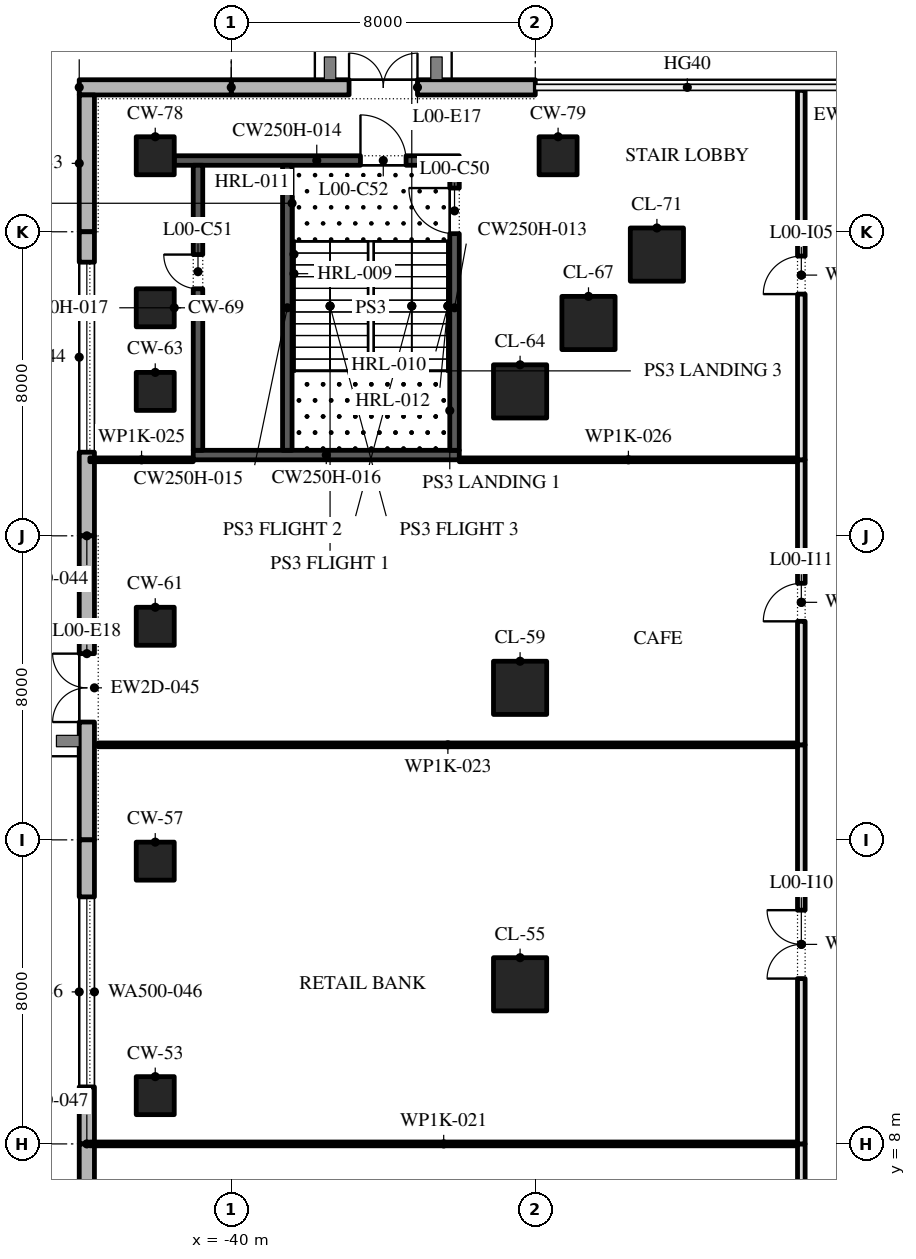
"""IFC4 building model, lengths in metres.
Left out: names, types, materials, properties, quantities, classifications, styles, units other than length and angle.
Written with IfcOpenShell. Run it as: python <this file> out.ifc"""

import sys

from ifc_helpers import new_model, si_unit, direction, frame, frame_2d, origin, origin_2d, place, context, subcontext, project, spatial, polyline, rectangle, outline, extrude, element, fill, save


model = new_model("IFC4")
c1 = context("Model", 3, precision=1e-05, world=origin(), true_north=direction((0.0, 1.0)))
c2 = subcontext(c1, "Body", "Model", "MODEL_VIEW")
j1 = project(units=[si_unit("LENGTHUNIT", "METRE"), si_unit("PLANEANGLEUNIT", "RADIAN")], contexts=[c1])
p1 = place(None, origin())
s1 = spatial("IfcSite", under=j1, at=p1, CompositionType="ELEMENT")
p2 = place(p1, origin())
s2 = spatial("IfcBuilding", under=s1, at=p2, CompositionType="ELEMENT")
p3 = place(p2, origin())
s3 = spatial("IfcBuildingStorey", under=s2, at=p3, CompositionType="ELEMENT", Elevation=0.0)
p4 = place(p3, frame((-42.0, 9.27, 0.0), z_axis=(0.0, 0.0, 1.0), x_axis=(1.0, 0.0, 0.0)))
e1 = element("IfcColumn", 1, at=p4, inside=s3, PredefinedType="COLUMN", context=c2, shape_type="SweptSolid", body=[
    extrude(rectangle(XDim=1.0, YDim=1.0, at=origin_2d()), origin(), (0.0, 0.0, 1.0), 8.0),
])
p5 = place(p3, frame((-32.4, 12.2, 0.0), z_axis=(0.0, 0.0, 1.0), x_axis=(1.0, 0.0, 0.0)))
e2 = element("IfcColumn", 2, at=p5, inside=s3, PredefinedType="COLUMN", context=c2, shape_type="SweptSolid", body=[
    extrude(rectangle(XDim=1.4, YDim=1.4, at=origin_2d()), origin(), (0.0, 0.0, 1.0), 8.0),
])
p6 = place(p3, frame((-42.0, 15.44, 0.0), z_axis=(0.0, 0.0, 1.0), x_axis=(1.0, 0.0, 0.0)))
e3 = element("IfcColumn", 3, at=p6, inside=s3, PredefinedType="COLUMN", context=c2, shape_type="SweptSolid", body=[
    extrude(rectangle(XDim=1.0, YDim=1.0, at=origin_2d()), origin(), (0.0, 0.0, 1.0), 8.0),
])
p7 = place(p3, frame((-32.4, 20.0, 0.0), z_axis=(0.0, 0.0, 1.0), x_axis=(1.0, 0.0, 0.0)))
e4 = element("IfcColumn", 4, at=p7, inside=s3, PredefinedType="COLUMN", context=c2, shape_type="SweptSolid", body=[
    extrude(rectangle(XDim=1.4, YDim=1.4, at=origin_2d()), origin(), (0.0, 0.0, 1.0), 8.0),
])
for number, where, z_axis, x_axis in (
    (5, (-42.0, 21.62, 0.0), (0.0, 0.0, 1.0), (1.0, 0.0, 0.0)),
    (6, (-42.0, 27.8, 0.0), (0.0, 0.0, 1.0), (1.0, 0.0, 0.0)),
):
    element("IfcColumn", number, at=place(p3, frame(where, z_axis=z_axis, x_axis=x_axis)), inside=s3, PredefinedType="COLUMN", context=c2, shape_type="SweptSolid", body=[
        extrude(rectangle(XDim=1.0, YDim=1.0, at=origin_2d()), origin(), (0.0, 0.0, 1.0), 8.0),
    ])
for number, where, z_axis, x_axis in (
    (7, (-32.4, 27.8, 0.0), (0.0, 0.0, 1.0), (1.0, 0.0, 0.0)),
    (8, (-30.6, 29.6, 0.0), (0.0, 0.0, 1.0), (1.0, 0.0, 0.0)),
):
    element("IfcColumn", number, at=place(p3, frame(where, z_axis=z_axis, x_axis=x_axis)), inside=s3, PredefinedType="COLUMN", context=c2, shape_type="SweptSolid", body=[
        extrude(rectangle(XDim=1.4, YDim=1.4, at=origin_2d()), origin(), (0.0, 0.0, 1.0), 8.0),
    ])
p8 = place(p3, frame((-42.0, 30.0, 0.0), z_axis=(0.0, 0.0, 1.0), x_axis=(1.0, 0.0, 0.0)))
e9 = element("IfcColumn", 9, at=p8, inside=s3, PredefinedType="COLUMN", context=c2, shape_type="SweptSolid", body=[
    extrude(rectangle(XDim=1.0, YDim=1.0, at=origin_2d()), origin(), (0.0, 0.0, 1.0), 8.0),
])
p9 = place(p3, frame((-28.8, 31.4, 0.0), z_axis=(0.0, 0.0, 1.0), x_axis=(1.0, 0.0, 0.0)))
e10 = element("IfcColumn", 10, at=p9, inside=s3, PredefinedType="COLUMN", context=c2, shape_type="SweptSolid", body=[
    extrude(rectangle(XDim=1.4, YDim=1.4, at=origin_2d()), origin(), (0.0, 0.0, 1.0), 8.0),
])
for number, where, z_axis, x_axis in (
    (11, (-42.0, 34.0, 0.0), (0.0, 0.0, 1.0), (1.0, 0.0, 0.0)),
    (12, (-31.4, 34.0, 0.0), (0.0, 0.0, 1.0), (1.0, 0.0, 0.0)),
):
    element("IfcColumn", number, at=place(p3, frame(where, z_axis=z_axis, x_axis=x_axis)), inside=s3, PredefinedType="COLUMN", context=c2, shape_type="SweptSolid", body=[
        extrude(rectangle(XDim=1.0, YDim=1.0, at=origin_2d()), origin(), (0.0, 0.0, 1.0), 8.0),
    ])
p10 = place(p3, frame((-32.0, 35.8, 0.0), z_axis=(0.0, 0.0, 1.0), x_axis=(-1.0, 0.0, 0.0)))
e13 = element("IfcWall", 13, at=p10, inside=s3, PredefinedType="STANDARD", context=c2, shape_type="SweptSolid", body=[
    extrude(rectangle(XDim=8.0, YDim=0.4, at=frame_2d((4.0, 0.0))), origin(), (0.0, 0.0, 1.0), 7.7),
])
p11 = place(p10, frame((3.1, 0.0, 0.0)))
e14 = element("IfcOpeningElement", 14, at=p11, cuts=e13, PredefinedType="OPENING", context=c2, shape_type="SweptSolid", body=[
    extrude(rectangle(XDim=1.8, YDim=2.7, at=frame_2d((0.9, 1.35))), frame((0.0, 0.21, 0.0), z_axis=(0.0, -1.0, 0.0), x_axis=(1.0, 0.0, 0.0)), (0.0, 0.0, 1.0), 0.42),
])
p12 = place(p3, frame((-40.0, 35.8, 0.0), z_axis=(0.0, 0.0, 1.0), x_axis=(-1.0, 0.0, 0.0)))
e15 = element("IfcWall", 15, at=p12, inside=s3, PredefinedType="STANDARD", context=c2, shape_type="SweptSolid", body=[
    extrude(rectangle(XDim=4.0, YDim=0.4, at=frame_2d((2.0, 0.0))), origin(), (0.0, 0.0, 1.0), 7.7),
])
p13 = place(p3, frame((-43.8, 35.6, 0.0), z_axis=(0.0, 0.0, 1.0), x_axis=(0.0, -1.0, 0.0)))
e16 = element("IfcWall", 16, at=p13, inside=s3, PredefinedType="STANDARD", context=c2, shape_type="SweptSolid", body=[
    extrude(rectangle(XDim=3.6, YDim=0.4, at=frame_2d((1.8, 0.0))), origin(), (0.0, 0.0, 1.0), 7.7),
])
p14 = place(p3, frame((-43.8, 32.0, 0.0), z_axis=(0.0, 0.0, 1.0), x_axis=(0.0, -1.0, 0.0)))
e17 = element("IfcWall", 17, at=p14, inside=s3, PredefinedType="STANDARD", context=c2, shape_type="SweptSolid", body=[
    extrude(rectangle(XDim=8.0, YDim=0.4, at=frame_2d((4.0, 0.0))), origin(), (0.0, 0.0, 1.0), 7.7),
])
p15 = place(p14, frame((0.8, 0.0, 0.5)))
e18 = element("IfcOpeningElement", 18, at=p15, cuts=e17, PredefinedType="OPENING", context=c2, shape_type="SweptSolid", body=[
    extrude(outline(polyline([(0.0, 0.0), (5.0, 0.0), (5.0, 3.35), (4.955, 3.907), (4.822, 4.451), (4.604, 4.966), (4.306, 5.44), (3.937, 5.86), (3.505, 6.216), (3.022, 6.498), (2.5, 6.7), (1.978, 6.498), (1.495, 6.216), (1.063, 5.86), (0.694, 5.44), (0.396, 4.966), (0.178, 4.451), (0.045, 3.907), (0.0, 3.35), (0.0, 0.0)])), frame((0.0, 0.21, 0.0), z_axis=(0.0, -1.0, 0.0), x_axis=(1.0, 0.0, 0.0)), (0.0, 0.0, 1.0), 0.42),
])
p16 = place(p3, frame((-43.8, 24.0, 0.0), z_axis=(0.0, 0.0, 1.0), x_axis=(0.0, -1.0, 0.0)))
e19 = element("IfcWall", 19, at=p16, inside=s3, PredefinedType="STANDARD", context=c2, shape_type="SweptSolid", body=[
    extrude(rectangle(XDim=8.0, YDim=0.4, at=frame_2d((4.0, 0.0))), origin(), (0.0, 0.0, 1.0), 7.7),
])
p17 = place(p16, frame((3.1, 0.0, 0.0)))
e20 = element("IfcOpeningElement", 20, at=p17, cuts=e19, PredefinedType="OPENING", context=c2, shape_type="SweptSolid", body=[
    extrude(rectangle(XDim=1.8, YDim=2.7, at=frame_2d((0.9, 1.35))), frame((0.0, 0.21, 0.0), z_axis=(0.0, -1.0, 0.0), x_axis=(1.0, 0.0, 0.0)), (0.0, 0.0, 1.0), 0.42),
])
p18 = place(p3, frame((-43.8, 16.0, 0.0), z_axis=(0.0, 0.0, 1.0), x_axis=(0.0, -1.0, 0.0)))
e21 = element("IfcWall", 21, at=p18, inside=s3, PredefinedType="STANDARD", context=c2, shape_type="SweptSolid", body=[
    extrude(rectangle(XDim=8.0, YDim=0.4, at=frame_2d((4.0, 0.0))), origin(), (0.0, 0.0, 1.0), 7.7),
])
p19 = place(p18, frame((1.5, 0.0, 0.5)))
e22 = element("IfcOpeningElement", 22, at=p19, cuts=e21, PredefinedType="OPENING", context=c2, shape_type="SweptSolid", body=[
    extrude(outline(polyline([(0.0, 0.0), (5.0, 0.0), (5.0, 3.35), (4.955, 3.907), (4.822, 4.451), (4.604, 4.966), (4.306, 5.44), (3.937, 5.86), (3.505, 6.216), (3.022, 6.498), (2.5, 6.7), (1.978, 6.498), (1.495, 6.216), (1.063, 5.86), (0.694, 5.44), (0.396, 4.966), (0.178, 4.451), (0.045, 3.907), (0.0, 3.35), (0.0, 0.0)])), frame((0.0, 0.21, 0.0), z_axis=(0.0, -1.0, 0.0), x_axis=(1.0, 0.0, 0.0)), (0.0, 0.0, 1.0), 0.42),
])
p20 = place(p3, frame((-43.8, 8.0, 0.0), z_axis=(0.0, 0.0, 1.0), x_axis=(0.0, -1.0, 0.0)))
e23 = element("IfcWall", 23, at=p20, inside=s3, PredefinedType="STANDARD", context=c2, shape_type="SweptSolid", body=[
    extrude(rectangle(XDim=8.0, YDim=0.4, at=frame_2d((4.0, 0.0))), origin(), (0.0, 0.0, 1.0), 7.7),
])
p21 = place(p20, frame((1.5, 0.0, 0.5)))
e24 = element("IfcOpeningElement", 24, at=p21, cuts=e23, PredefinedType="OPENING", context=c2, shape_type="SweptSolid", body=[
    extrude(outline(polyline([(0.0, 0.0), (5.0, 0.0), (5.0, 3.35), (4.955, 3.907), (4.822, 4.451), (4.604, 4.966), (4.306, 5.44), (3.937, 5.86), (3.505, 6.216), (3.022, 6.498), (2.5, 6.7), (1.978, 6.498), (1.495, 6.216), (1.063, 5.86), (0.694, 5.44), (0.396, 4.966), (0.178, 4.451), (0.045, 3.907), (0.0, 3.35), (0.0, 0.0)])), frame((0.0, 0.21, 0.0), z_axis=(0.0, -1.0, 0.0), x_axis=(1.0, 0.0, 0.0)), (0.0, 0.0, 1.0), 0.42),
])
p22 = place(p3, frame((-41.0, 26.125, 0.0), z_axis=(0.0, 0.0, 1.0), x_axis=(1.0, 0.0, 0.0)))
e25 = element("IfcWall", 25, at=p22, inside=s3, PredefinedType="SHEAR", context=c2, shape_type="SweptSolid", body=[
    extrude(rectangle(XDim=7.0, YDim=0.25, at=frame_2d((3.5, 0.0))), origin(), (0.0, 0.0, 1.0), 7.7),
])
p23 = place(p3, frame((-41.5, 33.875, 0.0), z_axis=(0.0, 0.0, 1.0), x_axis=(1.0, 0.0, 0.0)))
e26 = element("IfcWall", 26, at=p23, inside=s3, PredefinedType="SHEAR", context=c2, shape_type="SweptSolid", body=[
    extrude(rectangle(XDim=7.5, YDim=0.25, at=frame_2d((3.75, 0.0))), origin(), (0.0, 0.0, 1.0), 7.7),
])
p24 = place(p23, frame((4.9, 0.0, 0.0)))
e27 = element("IfcOpeningElement", 27, at=p24, cuts=e26, PredefinedType="OPENING", context=c2, shape_type="SweptSolid", body=[
    extrude(rectangle(XDim=1.2, YDim=2.1, at=frame_2d((0.6, 1.05))), frame((0.0, 0.135, 0.0), z_axis=(0.0, -1.0, 0.0), x_axis=(1.0, 0.0, 0.0)), (0.0, 0.0, 1.0), 0.27),
])
p25 = place(p3, frame((-40.875, 26.25, 0.0), z_axis=(0.0, 0.0, 1.0), x_axis=(0.0, 1.0, 0.0)))
e28 = element("IfcWall", 28, at=p25, inside=s3, PredefinedType="SHEAR", context=c2, shape_type="SweptSolid", body=[
    extrude(rectangle(XDim=7.5, YDim=0.25, at=frame_2d((3.75, 0.0))), origin(), (0.0, 0.0, 1.0), 7.7),
])
p26 = place(p25, frame((4.25, 0.0, 0.0)))
e29 = element("IfcOpeningElement", 29, at=p26, cuts=e28, PredefinedType="OPENING", context=c2, shape_type="SweptSolid", body=[
    extrude(rectangle(XDim=0.9, YDim=2.1, at=frame_2d((0.45, 1.05))), frame((0.0, 0.135, 0.0), z_axis=(0.0, -1.0, 0.0), x_axis=(1.0, 0.0, 0.0)), (0.0, 0.0, 1.0), 0.27),
])
p27 = place(p3, frame((-34.125, 26.25, 0.0), z_axis=(0.0, 0.0, 1.0), x_axis=(0.0, 1.0, 0.0)))
e30 = element("IfcWall", 30, at=p27, inside=s3, PredefinedType="SHEAR", context=c2, shape_type="SweptSolid", body=[
    extrude(rectangle(XDim=7.5, YDim=0.25, at=frame_2d((3.75, 0.0))), origin(), (0.0, 0.0, 1.0), 7.7),
])
p28 = place(p27, frame((5.7, 0.0, 0.0)))
e31 = element("IfcOpeningElement", 31, at=p28, cuts=e30, PredefinedType="OPENING", context=c2, shape_type="SweptSolid", body=[
    extrude(rectangle(XDim=1.2, YDim=2.1, at=frame_2d((0.6, 1.05))), frame((0.0, 0.135, 0.0), z_axis=(0.0, -1.0, 0.0), x_axis=(1.0, 0.0, 0.0)), (0.0, 0.0, 1.0), 0.27),
])
p29 = place(p3, frame((-38.525, 26.25, 0.0), z_axis=(0.0, 0.0, 1.0), x_axis=(0.0, 1.0, 0.0)))
e32 = element("IfcWall", 32, at=p29, inside=s3, PredefinedType="SHEAR", context=c2, shape_type="SweptSolid", body=[
    extrude(rectangle(XDim=7.5, YDim=0.25, at=frame_2d((3.75, 0.0))), origin(), (0.0, 0.0, 1.0), 7.7),
])
p30 = place(p3, frame((-43.72, 8.0, 0.0), z_axis=(0.0, 0.0, 1.0), x_axis=(1.0, 0.0, 0.0)))
e33 = element("IfcWall", 33, at=p30, inside=s3, PredefinedType="PARTITIONING", context=c2, shape_type="SweptSolid", body=[
    extrude(rectangle(XDim=18.62, YDim=0.1, at=frame_2d((9.31, 0.0))), origin(), (0.0, 0.0, 1.0), 7.7),
])
p31 = place(p3, frame((-43.5, 18.5, 0.0), z_axis=(0.0, 0.0, 1.0), x_axis=(1.0, 0.0, 0.0)))
e34 = element("IfcWall", 34, at=p31, inside=s3, PredefinedType="PARTITIONING", context=c2, shape_type="SweptSolid", body=[
    extrude(rectangle(XDim=18.4, YDim=0.1, at=frame_2d((9.2, 0.0))), origin(), (0.0, 0.0, 1.0), 7.7),
])
p32 = place(p3, frame((-43.72, 26.0, 0.0), z_axis=(0.0, 0.0, 1.0), x_axis=(1.0, 0.0, 0.0)))
e35 = element("IfcWall", 35, at=p32, inside=s3, PredefinedType="PARTITIONING", context=c2, shape_type="SweptSolid", body=[
    extrude(rectangle(XDim=2.72, YDim=0.1, at=frame_2d((1.36, 0.0))), origin(), (0.0, 0.0, 1.0), 7.7),
])
p33 = place(p3, frame((-34.0, 26.0, 0.0), z_axis=(0.0, 0.0, 1.0), x_axis=(1.0, 0.0, 0.0)))
e36 = element("IfcWall", 36, at=p33, inside=s3, PredefinedType="PARTITIONING", context=c2, shape_type="SweptSolid", body=[
    extrude(rectangle(XDim=8.9, YDim=0.1, at=frame_2d((4.45, 0.0))), origin(), (0.0, 0.0, 1.0), 7.7),
])
p34 = place(p3, frame((-25.0, -3.5, 0.0), z_axis=(0.0, 0.0, 1.0), x_axis=(0.0, 1.0, 0.0)))
e37 = element("IfcWall", 37, at=p34, inside=s3, PredefinedType="PARTITIONING", context=c2, shape_type="SweptSolid", body=[
    extrude(rectangle(XDim=11.5, YDim=0.2, at=frame_2d((5.75, 0.0))), origin(), (0.0, 0.0, 1.0), 7.7),
])
p35 = place(p34, frame((4.85, 0.0, 0.0)))
e38 = element("IfcOpeningElement", 38, at=p35, cuts=e37, PredefinedType="OPENING", context=c2, shape_type="SweptSolid", body=[
    extrude(rectangle(XDim=1.8, YDim=2.1, at=frame_2d((0.9, 1.05))), frame((0.0, 0.11, 0.0), z_axis=(0.0, -1.0, 0.0), x_axis=(1.0, 0.0, 0.0)), (0.0, 0.0, 1.0), 0.22),
])
p36 = place(p3, frame((-25.0, 8.0, 0.0), z_axis=(0.0, 0.0, 1.0), x_axis=(0.0, 1.0, 0.0)))
e39 = element("IfcWall", 39, at=p36, inside=s3, PredefinedType="PARTITIONING", context=c2, shape_type="SweptSolid", body=[
    extrude(rectangle(XDim=10.5, YDim=0.2, at=frame_2d((5.25, 0.0))), origin(), (0.0, 0.0, 1.0), 7.7),
])
p37 = place(p36, frame((4.35, 0.0, 0.0)))
e40 = element("IfcOpeningElement", 40, at=p37, cuts=e39, PredefinedType="OPENING", context=c2, shape_type="SweptSolid", body=[
    extrude(rectangle(XDim=1.8, YDim=2.1, at=frame_2d((0.9, 1.05))), frame((0.0, 0.11, 0.0), z_axis=(0.0, -1.0, 0.0), x_axis=(1.0, 0.0, 0.0)), (0.0, 0.0, 1.0), 0.22),
])
p38 = place(p3, frame((-25.0, 18.5, 0.0), z_axis=(0.0, 0.0, 1.0), x_axis=(0.0, 1.0, 0.0)))
e41 = element("IfcWall", 41, at=p38, inside=s3, PredefinedType="PARTITIONING", context=c2, shape_type="SweptSolid", body=[
    extrude(rectangle(XDim=7.5, YDim=0.2, at=frame_2d((3.75, 0.0))), origin(), (0.0, 0.0, 1.0), 7.7),
])
p39 = place(p38, frame((3.25, 0.0, 0.0)))
e42 = element("IfcOpeningElement", 42, at=p39, cuts=e41, PredefinedType="OPENING", context=c2, shape_type="SweptSolid", body=[
    extrude(rectangle(XDim=1.0, YDim=2.1, at=frame_2d((0.5, 1.05))), frame((0.0, 0.11, 0.0), z_axis=(0.0, -1.0, 0.0), x_axis=(1.0, 0.0, 0.0)), (0.0, 0.0, 1.0), 0.22),
])
p40 = place(p3, frame((-25.0, 26.0, 0.0), z_axis=(0.0, 0.0, 1.0), x_axis=(0.0, 1.0, 0.0)))
e43 = element("IfcWall", 43, at=p40, inside=s3, PredefinedType="PARTITIONING", context=c2, shape_type="SweptSolid", body=[
    extrude(rectangle(XDim=9.72, YDim=0.2, at=frame_2d((4.86, 0.0))), origin(), (0.0, 0.0, 1.0), 7.7),
])
p41 = place(p40, frame((4.36, 0.0, 0.0)))
e44 = element("IfcOpeningElement", 44, at=p41, cuts=e43, PredefinedType="OPENING", context=c2, shape_type="SweptSolid", body=[
    extrude(rectangle(XDim=1.0, YDim=2.1, at=frame_2d((0.5, 1.05))), frame((0.0, 0.11, 0.0), z_axis=(0.0, -1.0, 0.0), x_axis=(1.0, 0.0, 0.0)), (0.0, 0.0, 1.0), 0.22),
])
p42 = place(p11, frame((1.8, 0.0, 0.0), z_axis=(0.0, 0.0, 1.0), x_axis=(-1.0, 0.0, 0.0)))
e45 = element("IfcDoor", 45, at=p42, inside=s3, OperationType="DOUBLE_DOOR_SINGLE_SWING", PredefinedType="DOOR", context=c2, shape_type="SweptSolid", body=[
    extrude(rectangle(XDim=1.8, YDim=2.7, at=frame_2d((0.9, 1.35))), frame((0.0, 0.025, 0.0), z_axis=(0.0, -1.0, 0.0), x_axis=(1.0, 0.0, 0.0)), (0.0, 0.0, 1.0), 0.05),
])
fill(e14, e45)
p43 = place(p15, origin())
e46 = element("IfcWindow", 46, at=p43, inside=s3, PartitioningType="DOUBLE_PANEL_VERTICAL", PredefinedType="WINDOW", context=c2, shape_type="SweptSolid", body=[
    extrude(outline(polyline([(0.0, 0.0), (5.0, 0.0), (5.0, 3.35), (4.955, 3.907), (4.822, 4.451), (4.604, 4.966), (4.306, 5.44), (3.937, 5.86), (3.505, 6.216), (3.022, 6.498), (2.5, 6.7), (1.978, 6.498), (1.495, 6.216), (1.063, 5.86), (0.694, 5.44), (0.396, 4.966), (0.178, 4.451), (0.045, 3.907), (0.0, 3.35), (0.0, 0.0)])), frame((0.0, 0.03, 0.0), z_axis=(0.0, -1.0, 0.0), x_axis=(1.0, 0.0, 0.0)), (0.0, 0.0, 1.0), 0.06),
])
fill(e18, e46)
p44 = place(p17, frame((1.8, 0.0, 0.0), z_axis=(0.0, 0.0, 1.0), x_axis=(-1.0, 0.0, 0.0)))
e47 = element("IfcDoor", 47, at=p44, inside=s3, OperationType="DOUBLE_DOOR_SINGLE_SWING", PredefinedType="DOOR", context=c2, shape_type="SweptSolid", body=[
    extrude(rectangle(XDim=1.8, YDim=2.7, at=frame_2d((0.9, 1.35))), frame((0.0, 0.025, 0.0), z_axis=(0.0, -1.0, 0.0), x_axis=(1.0, 0.0, 0.0)), (0.0, 0.0, 1.0), 0.05),
])
fill(e20, e47)
p45 = place(p19, origin())
e48 = element("IfcWindow", 48, at=p45, inside=s3, PartitioningType="DOUBLE_PANEL_VERTICAL", PredefinedType="WINDOW", context=c2, shape_type="SweptSolid", body=[
    extrude(outline(polyline([(0.0, 0.0), (5.0, 0.0), (5.0, 3.35), (4.955, 3.907), (4.822, 4.451), (4.604, 4.966), (4.306, 5.44), (3.937, 5.86), (3.505, 6.216), (3.022, 6.498), (2.5, 6.7), (1.978, 6.498), (1.495, 6.216), (1.063, 5.86), (0.694, 5.44), (0.396, 4.966), (0.178, 4.451), (0.045, 3.907), (0.0, 3.35), (0.0, 0.0)])), frame((0.0, 0.03, 0.0), z_axis=(0.0, -1.0, 0.0), x_axis=(1.0, 0.0, 0.0)), (0.0, 0.0, 1.0), 0.06),
])
fill(e22, e48)
p46 = place(p28, origin())
e49 = element("IfcDoor", 49, at=p46, inside=s3, OperationType="SINGLE_SWING_LEFT", PredefinedType="DOOR", context=c2, shape_type="SweptSolid", body=[
    extrude(rectangle(XDim=1.2, YDim=2.1, at=frame_2d((0.6, 1.05))), frame((0.0, 0.025, 0.0), z_axis=(0.0, -1.0, 0.0), x_axis=(1.0, 0.0, 0.0)), (0.0, 0.0, 1.0), 0.05),
])
fill(e31, e49)
p47 = place(p26, origin())
e50 = element("IfcDoor", 50, at=p47, inside=s3, OperationType="SINGLE_SWING_LEFT", PredefinedType="DOOR", context=c2, shape_type="SweptSolid", body=[
    extrude(rectangle(XDim=0.9, YDim=2.1, at=frame_2d((0.45, 1.05))), frame((0.0, -0.075, 0.0), z_axis=(0.0, -1.0, 0.0), x_axis=(1.0, 0.0, 0.0)), (0.0, 0.0, 1.0), 0.05),
])
fill(e29, e50)
p48 = place(p24, origin())
e51 = element("IfcDoor", 51, at=p48, inside=s3, OperationType="SINGLE_SWING_RIGHT", PredefinedType="DOOR", context=c2, shape_type="SweptSolid", body=[
    extrude(rectangle(XDim=1.2, YDim=2.1, at=frame_2d((0.6, 1.05))), frame((0.0, 0.025, 0.0), z_axis=(0.0, -1.0, 0.0), x_axis=(1.0, 0.0, 0.0)), (0.0, 0.0, 1.0), 0.05),
])
fill(e27, e51)
p49 = place(p41, origin())
e52 = element("IfcDoor", 52, at=p49, inside=s3, OperationType="SINGLE_SWING_RIGHT", PredefinedType="DOOR", context=c2, shape_type="SweptSolid", body=[
    extrude(rectangle(XDim=1.0, YDim=2.1, at=frame_2d((0.5, 1.05))), frame((0.0, 0.025, 0.0), z_axis=(0.0, -1.0, 0.0), x_axis=(1.0, 0.0, 0.0)), (0.0, 0.0, 1.0), 0.05),
])
fill(e44, e52)
p50 = place(p37, origin())
e53 = element("IfcDoor", 53, at=p50, inside=s3, OperationType="SINGLE_SWING_RIGHT", PredefinedType="DOOR", context=c2, shape_type="SweptSolid", body=[
    extrude(rectangle(XDim=1.8, YDim=2.1, at=frame_2d((0.9, 1.05))), frame((0.0, 0.025, 0.0), z_axis=(0.0, -1.0, 0.0), x_axis=(1.0, 0.0, 0.0)), (0.0, 0.0, 1.0), 0.05),
])
fill(e40, e53)
p51 = place(p39, origin())
e54 = element("IfcDoor", 54, at=p51, inside=s3, OperationType="SINGLE_SWING_RIGHT", PredefinedType="DOOR", context=c2, shape_type="SweptSolid", body=[
    extrude(rectangle(XDim=1.0, YDim=2.1, at=frame_2d((0.5, 1.05))), frame((0.0, 0.025, 0.0), z_axis=(0.0, -1.0, 0.0), x_axis=(1.0, 0.0, 0.0)), (0.0, 0.0, 1.0), 0.05),
])
fill(e42, e54)
save(model, sys.argv[1])
